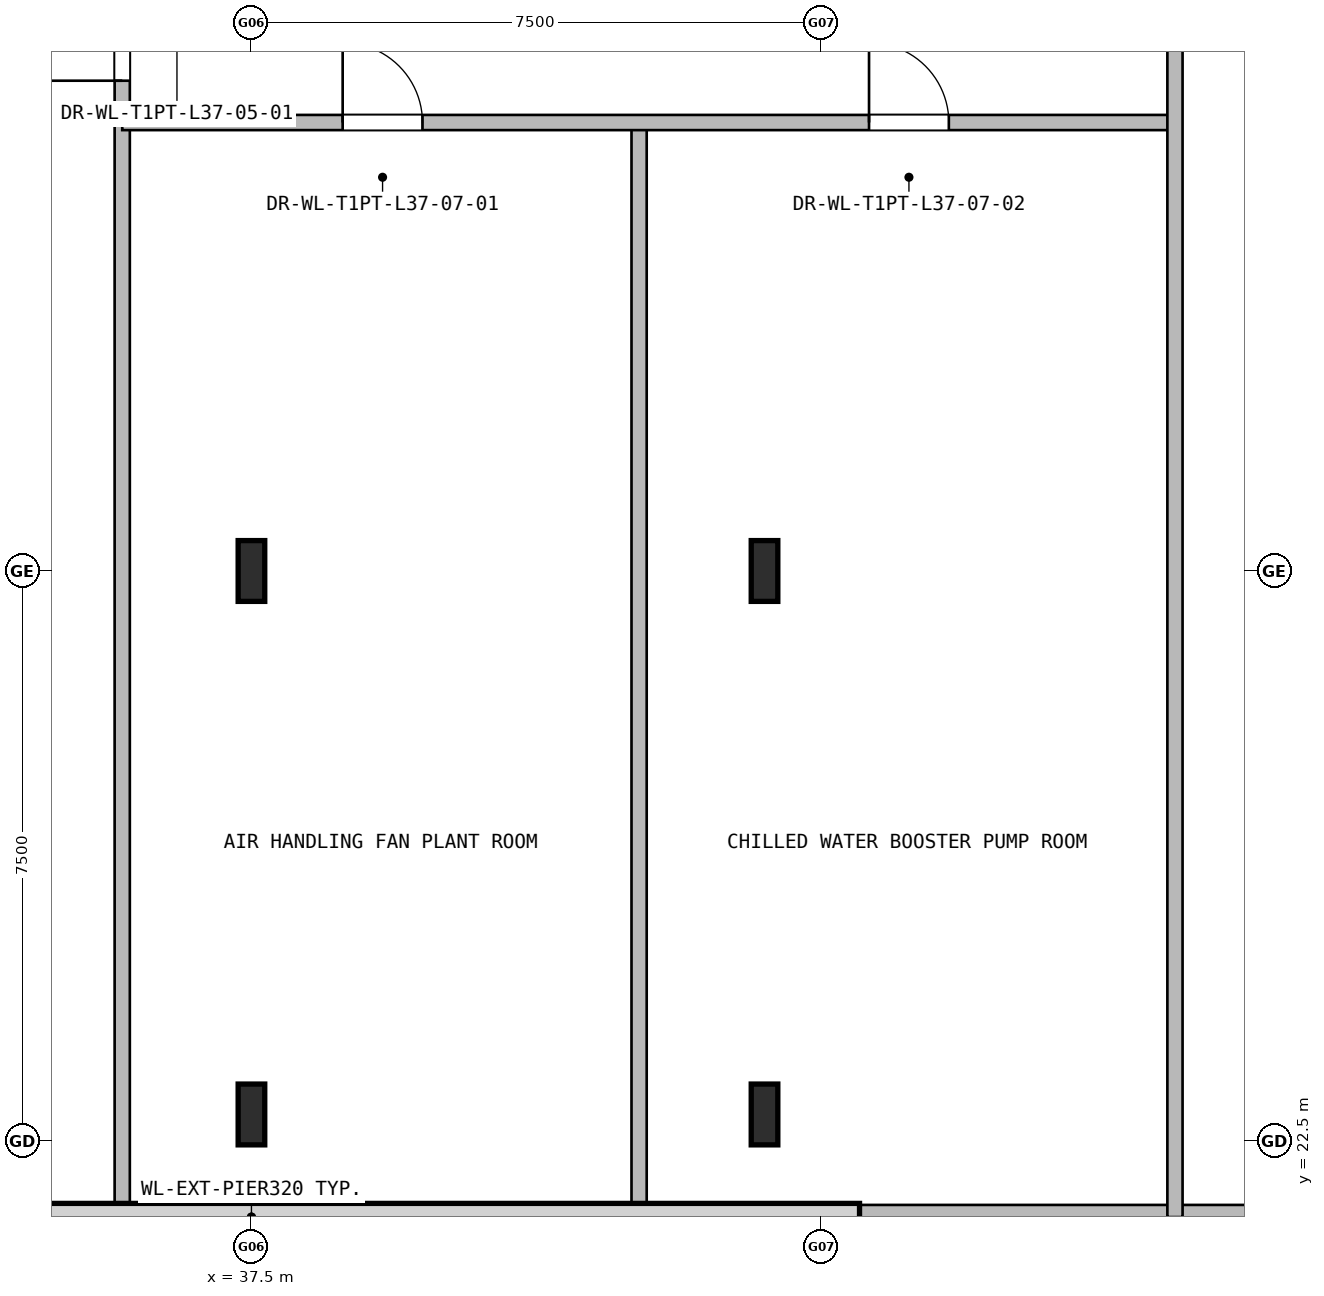
"""IFC4 building model, lengths in metres.
Left out: names, types, materials, properties, quantities, classifications, styles, units other than length and angle.
Written with IfcOpenShell. Run it as: python <this file> out.ifc"""

import sys

from ifc_helpers import new_model, si_unit, direction, frame, frame_2d, origin, origin_2d, place, context, subcontext, project, spatial, rectangle, i_section, extrude, element, fill, save


model = new_model("IFC4")
c1 = context("Model", 3, precision=1e-05, world=origin(), true_north=direction((0.0, 1.0)))
c2 = subcontext(c1, "Body", "Model", "MODEL_VIEW")
j1 = project(units=[si_unit("LENGTHUNIT", "METRE"), si_unit("PLANEANGLEUNIT", "RADIAN")], contexts=[c1])
p1 = place(None, origin())
s1 = spatial("IfcSite", under=j1, at=p1, CompositionType="ELEMENT")
p2 = place(p1, origin())
s2 = spatial("IfcBuilding", under=s1, at=p2, CompositionType="ELEMENT")
p3 = place(p2, frame((0.0, 0.0, 138.0)))
s3 = spatial("IfcBuildingStorey", under=s2, at=p3, CompositionType="ELEMENT", Elevation=138.0)
for number, where, z_axis, x_axis in (
    (1, (37.5, 22.85, 0.0), (0.0, 0.0, 1.0), (1.0, 0.0, 0.0)),
    (2, (37.5, 30.0, 0.0), (0.0, 0.0, 1.0), (1.0, 0.0, 0.0)),
    (3, (44.25, 22.85, 0.0), (0.0, 0.0, 1.0), (1.0, 0.0, 0.0)),
    (4, (44.25, 30.0, 0.0), (0.0, 0.0, 1.0), (1.0, 0.0, 0.0)),
):
    element("IfcColumn", number, at=place(p3, frame(where, z_axis=z_axis, x_axis=x_axis)), inside=s3, PredefinedType="COLUMN", context=c2, shape_type="SweptSolid", body=[
        extrude(i_section(OverallWidth=0.35, OverallDepth=0.8, WebThickness=0.018, FlangeThickness=0.032, at=origin_2d()), origin(), (0.0, 0.0, 1.0), 4.8),
    ])
p4 = place(p3, frame((56.2, 21.5, 0.0), z_axis=(0.0, 0.0, 1.0), x_axis=(-1.0, 0.0, 0.0)))
e5 = element("IfcWall", 5, at=p4, inside=s3, PredefinedType="SOLIDWALL", context=c2, shape_type="SweptSolid", body=[
    extrude(rectangle(XDim=37.4, YDim=0.32, at=frame_2d((18.7, 0.0))), origin(), (0.0, 0.0, 1.0), 4.53),
])
p5 = place(p3, frame((35.8, 21.5, 0.0), z_axis=(0.0, 0.0, 1.0), x_axis=(0.0, 1.0, 0.0)))
e6 = element("IfcWall", 6, at=p5, inside=s3, PredefinedType="PARTITIONING", context=c2, shape_type="SweptSolid", body=[
    extrude(rectangle(XDim=16.4, YDim=0.2, at=frame_2d((8.2, 0.0))), origin(), (0.0, 0.0, 1.0), 4.53),
])
p6 = place(p5, frame((14.95, 0.0, 0.0)))
e7 = element("IfcOpeningElement", 7, at=p6, cuts=e6, PredefinedType="OPENING", context=c2, shape_type="SweptSolid", body=[
    extrude(rectangle(XDim=1.05, YDim=2.1, at=frame_2d((0.525, 1.05))), frame((0.0, 0.11, 0.0), z_axis=(0.0, -1.0, 0.0), x_axis=(1.0, 0.0, 0.0)), (0.0, 0.0, 1.0), 0.22),
])
p7 = place(p3, frame((42.6, 21.5, 0.0), z_axis=(0.0, 0.0, 1.0), x_axis=(0.0, 1.0, 0.0)))
e8 = element("IfcWall", 8, at=p7, inside=s3, PredefinedType="PARTITIONING", context=c2, shape_type="SweptSolid", body=[
    extrude(rectangle(XDim=14.4, YDim=0.2, at=frame_2d((7.2, 0.0))), origin(), (0.0, 0.0, 1.0), 4.53),
])
p8 = place(p3, frame((35.8, 35.9, 0.0), z_axis=(0.0, 0.0, 1.0), x_axis=(1.0, 0.0, 0.0)))
e9 = element("IfcWall", 9, at=p8, inside=s3, PredefinedType="PARTITIONING", context=c2, shape_type="SweptSolid", body=[
    extrude(rectangle(XDim=13.85, YDim=0.2, at=frame_2d((6.925, 0.0))), origin(), (0.0, 0.0, 1.0), 4.53),
])
p9 = place(p8, frame((2.9, 0.0, 0.0)))
e10 = element("IfcOpeningElement", 10, at=p9, cuts=e9, PredefinedType="OPENING", context=c2, shape_type="SweptSolid", body=[
    extrude(rectangle(XDim=1.05, YDim=2.1, at=frame_2d((0.525, 1.05))), frame((0.0, 0.11, 0.0), z_axis=(0.0, -1.0, 0.0), x_axis=(1.0, 0.0, 0.0)), (0.0, 0.0, 1.0), 0.22),
])
p10 = place(p8, frame((9.825, 0.0, 0.0)))
e11 = element("IfcOpeningElement", 11, at=p10, cuts=e9, PredefinedType="OPENING", context=c2, shape_type="SweptSolid", body=[
    extrude(rectangle(XDim=1.05, YDim=2.1, at=frame_2d((0.525, 1.05))), frame((0.0, 0.11, 0.0), z_axis=(0.0, -1.0, 0.0), x_axis=(1.0, 0.0, 0.0)), (0.0, 0.0, 1.0), 0.22),
])
p11 = place(p3, frame((49.65, 21.5, 0.0), z_axis=(0.0, 0.0, 1.0), x_axis=(0.0, 1.0, 0.0)))
e12 = element("IfcWall", 12, at=p11, inside=s3, PredefinedType="PARTITIONING", context=c2, shape_type="SweptSolid", body=[
    extrude(rectangle(XDim=16.4, YDim=0.2, at=frame_2d((8.2, 0.0))), origin(), (0.0, 0.0, 1.0), 4.53),
])
p12 = place(p6, origin())
e13 = element("IfcDoor", 13, at=p12, inside=s3, OperationType="SINGLE_SWING_LEFT", PredefinedType="DOOR", context=c2, shape_type="SweptSolid", body=[
    extrude(rectangle(XDim=1.05, YDim=2.1, at=frame_2d((0.525, 1.05))), frame((0.0, 0.025, 0.0), z_axis=(0.0, -1.0, 0.0), x_axis=(1.0, 0.0, 0.0)), (0.0, 0.0, 1.0), 0.05),
])
fill(e7, e13)
p13 = place(p9, origin())
e14 = element("IfcDoor", 14, at=p13, inside=s3, OperationType="SINGLE_SWING_RIGHT", PredefinedType="DOOR", context=c2, shape_type="SweptSolid", body=[
    extrude(rectangle(XDim=1.05, YDim=2.1, at=frame_2d((0.525, 1.05))), frame((0.0, 0.025, 0.0), z_axis=(0.0, -1.0, 0.0), x_axis=(1.0, 0.0, 0.0)), (0.0, 0.0, 1.0), 0.05),
])
fill(e10, e14)
p14 = place(p10, origin())
e15 = element("IfcDoor", 15, at=p14, inside=s3, OperationType="SINGLE_SWING_LEFT", PredefinedType="DOOR", context=c2, shape_type="SweptSolid", body=[
    extrude(rectangle(XDim=1.05, YDim=2.1, at=frame_2d((0.525, 1.05))), frame((0.0, 0.025, 0.0), z_axis=(0.0, -1.0, 0.0), x_axis=(1.0, 0.0, 0.0)), (0.0, 0.0, 1.0), 0.05),
])
fill(e11, e15)
save(model, sys.argv[1])
